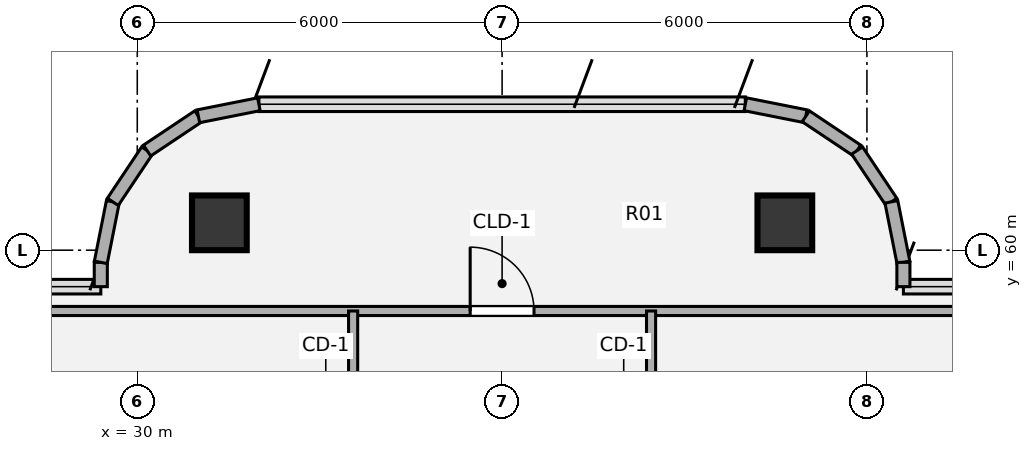
"""IFC4 building model, lengths in metres.
Left out: names, types, materials, properties, quantities, classifications, styles, units other than length and angle.
Written with IfcOpenShell. Run it as: python <this file> out.ifc"""

import sys

from ifc_helpers import new_model, si_unit, direction, frame, frame_2d, origin, origin_2d, place, context, subcontext, project, spatial, rectangle, hollow_circle, extrude, source, transform, mapped, element, fill, save


model = new_model("IFC4")
c1 = context("Model", 3, precision=1e-05, world=origin(), true_north=direction((0.0, 1.0)))
c2 = subcontext(c1, "Body", "Model", "MODEL_VIEW")
j1 = project(units=[si_unit("LENGTHUNIT", "METRE"), si_unit("PLANEANGLEUNIT", "RADIAN")], contexts=[c1])
p1 = place(None, origin())
s1 = spatial("IfcSite", under=j1, at=p1, CompositionType="ELEMENT")
p2 = place(p1, origin())
s2 = spatial("IfcBuilding", under=s1, at=p2, CompositionType="ELEMENT")
p3 = place(p2, frame((0.0, 0.0, 238.14)))
s3 = spatial("IfcBuildingStorey", under=s2, at=p3, CompositionType="ELEMENT", Elevation=238.14)
m1 = source(origin(), c2, "Body", "SweptSolid", [
    extrude(hollow_circle(Radius=0.45, WallThickness=0.032, at=origin_2d()), origin(), (0.0, 0.0, 1.0), 3.78),
])
for number, where, z_axis, x_axis in (
    (1, (31.35, 60.45, 0.0), (0.0, 0.0, 1.0), (1.0, 0.0, 0.0)),
    (2, (40.65, 60.45, 0.0), (0.0, 0.0, 1.0), (1.0, 0.0, 0.0)),
):
    element("IfcColumn", number, at=place(p3, frame(where, z_axis=z_axis, x_axis=x_axis)), inside=s3, PredefinedType="COLUMN", context=c2, shape_type="MappedRepresentation", body=[
        mapped(m1, transform((0.0, 0.0, 0.0), x_axis=(1.0, 0.0, 0.0), y_axis=(0.0, 1.0, 0.0), z_axis=(0.0, 0.0, 1.0), scale=1.0)),
    ])
p4 = place(p3, frame((29.4, 59.4, 0.0), z_axis=(0.0, 0.0, 1.0), x_axis=(0.0, 1.0, 0.0)))
e3 = element("IfcWall", 3, at=p4, inside=s3, PredefinedType="SOLIDWALL", context=c2, shape_type="SweptSolid", body=[
    extrude(rectangle(XDim=0.4, YDim=0.215, at=frame_2d((0.2, 0.0))), origin(), (0.0, 0.0, 1.0), 3.53),
])
p5 = place(p3, frame((29.4, 59.8, 0.0), z_axis=(0.0, 0.0, 1.0), x_axis=(0.195190360752, 0.980765376158, 0.0)))
e4 = element("IfcWall", 4, at=p5, inside=s3, PredefinedType="SOLIDWALL", context=c2, shape_type="SweptSolid", body=[
    extrude(rectangle(XDim=1.014, YDim=0.215, at=frame_2d((0.507, 0.0))), origin(), (0.0, 0.0, 1.0), 3.53),
])
p6 = place(p3, frame((29.598, 60.795, 0.0), z_axis=(0.0, 0.0, 1.0), x_axis=(0.555643898837, 0.831420385657, 0.0)))
e5 = element("IfcWall", 5, at=p6, inside=s3, PredefinedType="SOLIDWALL", context=c2, shape_type="SweptSolid", body=[
    extrude(rectangle(XDim=1.015, YDim=0.215, at=frame_2d((0.507, 0.0))), origin(), (0.0, 0.0, 1.0), 3.53),
])
p7 = place(p3, frame((30.162, 61.638, 0.0), z_axis=(0.0, 0.0, 1.0), x_axis=(0.831346067305, 0.555755086685, 0.0)))
e6 = element("IfcWall", 6, at=p7, inside=s3, PredefinedType="SOLIDWALL", context=c2, shape_type="SweptSolid", body=[
    extrude(rectangle(XDim=1.014, YDim=0.215, at=frame_2d((0.507, 0.0))), origin(), (0.0, 0.0, 1.0), 3.53),
])
for number, where, z_axis, x_axis in (
    (7, (31.005, 62.202, 0.0), (0.0, 0.0, 1.0), (0.981, 0.195, 0.0)),
    (8, (40.0, 62.4, 0.0), (0.0, 0.0, 1.0), (0.981, -0.195, 0.0)),
):
    element("IfcWall", number, at=place(p3, frame(where, z_axis=z_axis, x_axis=x_axis)), inside=s3, PredefinedType="SOLIDWALL", context=c2, shape_type="SweptSolid", body=[
        extrude(rectangle(XDim=1.015, YDim=0.215, at=frame_2d((0.507, 0.0))), origin(), (0.0, 0.0, 1.0), 3.53),
    ])
p8 = place(p3, frame((40.995, 62.202, 0.0), z_axis=(0.0, 0.0, 1.0), x_axis=(0.831346067305, -0.555755086685, 0.0)))
e9 = element("IfcWall", 9, at=p8, inside=s3, PredefinedType="SOLIDWALL", context=c2, shape_type="SweptSolid", body=[
    extrude(rectangle(XDim=1.014, YDim=0.215, at=frame_2d((0.507, 0.0))), origin(), (0.0, 0.0, 1.0), 3.53),
])
p9 = place(p3, frame((41.838, 61.638, 0.0), z_axis=(0.0, 0.0, 1.0), x_axis=(0.555643898837, -0.831420385657, 0.0)))
e10 = element("IfcWall", 10, at=p9, inside=s3, PredefinedType="SOLIDWALL", context=c2, shape_type="SweptSolid", body=[
    extrude(rectangle(XDim=1.015, YDim=0.215, at=frame_2d((0.507, 0.0))), origin(), (0.0, 0.0, 1.0), 3.53),
])
p10 = place(p3, frame((42.402, 60.795, 0.0), z_axis=(0.0, 0.0, 1.0), x_axis=(0.195190360752, -0.980765376158, 0.0)))
e11 = element("IfcWall", 11, at=p10, inside=s3, PredefinedType="SOLIDWALL", context=c2, shape_type="SweptSolid", body=[
    extrude(rectangle(XDim=1.014, YDim=0.215, at=frame_2d((0.507, 0.0))), origin(), (0.0, 0.0, 1.0), 3.53),
])
p11 = place(p3, frame((42.6, 59.8, 0.0), z_axis=(0.0, 0.0, 1.0), x_axis=(0.0, -1.0, 0.0)))
e12 = element("IfcWall", 12, at=p11, inside=s3, PredefinedType="SOLIDWALL", context=c2, shape_type="SweptSolid", body=[
    extrude(rectangle(XDim=0.4, YDim=0.215, at=frame_2d((0.2, 0.0))), origin(), (0.0, 0.0, 1.0), 3.53),
])
p12 = place(p3, frame((27.1, 59.0, 0.0), z_axis=(0.0, 0.0, 1.0), x_axis=(1.0, 0.0, 0.0)))
e13 = element("IfcWall", 13, at=p12, inside=s3, PredefinedType="PARTITIONING", context=c2, shape_type="SweptSolid", body=[
    extrude(rectangle(XDim=17.8, YDim=0.15, at=frame_2d((8.9, 0.0))), origin(), (0.0, 0.0, 1.0), 3.308),
])
p13 = place(p12, frame((8.375, 0.0, 0.0)))
e14 = element("IfcOpeningElement", 14, at=p13, cuts=e13, PredefinedType="OPENING", context=c2, shape_type="SweptSolid", body=[
    extrude(rectangle(XDim=1.05, YDim=2.1, at=origin_2d()), frame((0.525, 0.085, 1.05), z_axis=(0.0, -1.0, 0.0), x_axis=(1.0, 0.0, 0.0)), (0.0, 0.0, 1.0), 0.17),
])
p14 = place(p3, frame((33.55, 55.842, 0.0), z_axis=(0.0, 0.0, 1.0), x_axis=(0.0, 1.0, 0.0)))
e15 = element("IfcWall", 15, at=p14, inside=s3, PredefinedType="PARTITIONING", context=c2, shape_type="SweptSolid", body=[
    extrude(rectangle(XDim=3.158, YDim=0.15, at=frame_2d((1.579, 0.0))), origin(), (0.0, 0.0, 1.0), 3.5),
])
p15 = place(p14, frame((1.059, 0.0, 0.0)))
e16 = element("IfcOpeningElement", 16, at=p15, cuts=e15, PredefinedType="OPENING", context=c2, shape_type="SweptSolid", body=[
    extrude(rectangle(XDim=1.05, YDim=2.1, at=origin_2d()), frame((0.525, 0.085, 1.05), z_axis=(0.0, -1.0, 0.0), x_axis=(1.0, 0.0, 0.0)), (0.0, 0.0, 1.0), 0.17),
])
p16 = place(p3, frame((38.45, 55.842, 0.0), z_axis=(0.0, 0.0, 1.0), x_axis=(0.0, 1.0, 0.0)))
e17 = element("IfcWall", 17, at=p16, inside=s3, PredefinedType="PARTITIONING", context=c2, shape_type="SweptSolid", body=[
    extrude(rectangle(XDim=3.158, YDim=0.15, at=frame_2d((1.579, 0.0))), origin(), (0.0, 0.0, 1.0), 3.5),
])
p17 = place(p16, frame((1.059, 0.0, 0.0)))
e18 = element("IfcOpeningElement", 18, at=p17, cuts=e17, PredefinedType="OPENING", context=c2, shape_type="SweptSolid", body=[
    extrude(rectangle(XDim=1.05, YDim=2.1, at=origin_2d()), frame((0.525, 0.085, 1.05), z_axis=(0.0, -1.0, 0.0), x_axis=(1.0, 0.0, 0.0)), (0.0, 0.0, 1.0), 0.17),
])
m2 = source(origin(), c2, "Body", "SweptSolid", [
    extrude(rectangle(XDim=1.05, YDim=2.1, at=origin_2d()), frame((0.525, 0.025, 1.05), z_axis=(0.0, -1.0, 0.0), x_axis=(1.0, 0.0, 0.0)), (0.0, 0.0, 1.0), 0.05),
])
p18 = place(p13, origin())
e19 = element("IfcDoor", 19, at=p18, inside=s3, OperationType="SINGLE_SWING_LEFT", PredefinedType="DOOR", context=c2, shape_type="MappedRepresentation", body=[
    mapped(m2, transform((0.0, 0.0, 0.0), x_axis=(1.0, 0.0, 0.0), y_axis=(0.0, 1.0, 0.0), z_axis=(0.0, 0.0, 1.0), scale=1.0)),
])
fill(e14, e19)
save(model, sys.argv[1])
